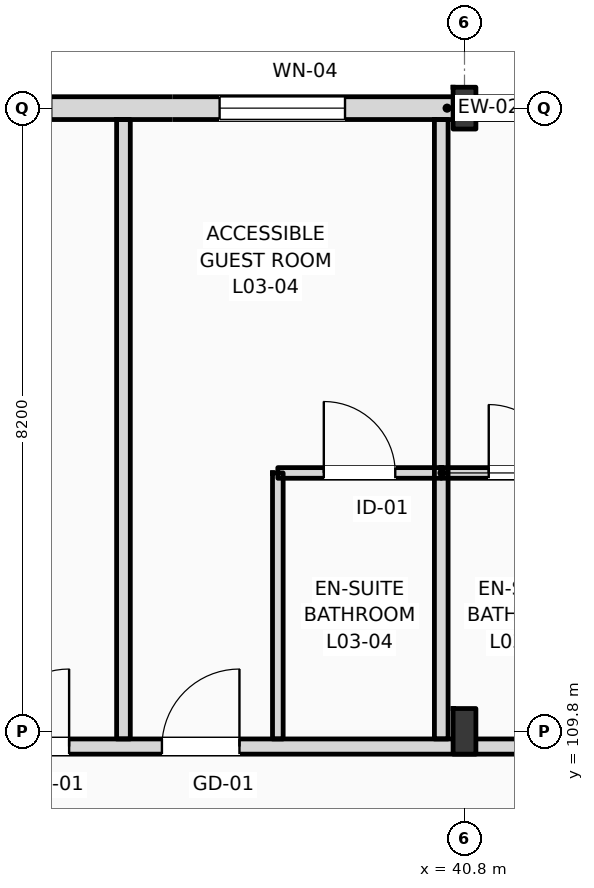
"""IFC4 building model, lengths in metres.
Left out: names, types, materials, properties, quantities, classifications, styles, units other than length and angle.
Written with IfcOpenShell. Run it as: python <this file> out.ifc"""

import sys

from ifc_helpers import new_model, si_unit, direction, frame, frame_2d, origin, origin_2d, place, context, subcontext, project, spatial, rectangle, i_section, extrude, element, fill, save


model = new_model("IFC4")
c1 = context("Model", 3, precision=1e-05, world=origin(), true_north=direction((0.0, 1.0)))
c2 = subcontext(c1, "Body", "Model", "MODEL_VIEW")
j1 = project(units=[si_unit("LENGTHUNIT", "METRE"), si_unit("PLANEANGLEUNIT", "RADIAN")], contexts=[c1])
p1 = place(None, origin())
s1 = spatial("IfcSite", under=j1, at=p1, CompositionType="ELEMENT")
p2 = place(p1, origin())
s2 = spatial("IfcBuilding", under=s1, at=p2, CompositionType="ELEMENT")
p3 = place(p2, frame((0.0, 0.0, 16.2)))
s3 = spatial("IfcBuildingStorey", under=s2, at=p3, CompositionType="ELEMENT", Elevation=16.2)
p4 = place(p3, frame((40.8, 109.8, 0.0), z_axis=(0.0, 0.0, 1.0), x_axis=(1.0, 0.0, 0.0)))
e1 = element("IfcColumn", 1, at=p4, inside=s3, PredefinedType="COLUMN", context=c2, shape_type="SweptSolid", body=[
    extrude(i_section(OverallWidth=0.3, OverallDepth=0.6, WebThickness=0.015, FlangeThickness=0.03, FilletRadius=0.027, at=origin_2d()), origin(), (0.0, 0.0, 1.0), 4.2),
])
p5 = place(p3, frame((40.8, 118.0, 0.0), z_axis=(0.0, 0.0, 1.0), x_axis=(1.0, 0.0, 0.0)))
e2 = element("IfcColumn", 2, at=p5, inside=s3, PredefinedType="COLUMN", context=c2, shape_type="SweptSolid", body=[
    extrude(i_section(OverallWidth=0.3, OverallDepth=0.55, WebThickness=0.015, FlangeThickness=0.029, FilletRadius=0.027, at=origin_2d()), origin(), (0.0, 0.0, 1.0), 4.2),
])
p6 = place(p3, frame((22.5, 118.0, 0.0), z_axis=(0.0, 0.0, 1.0), x_axis=(1.0, 0.0, 0.0)))
e3 = element("IfcWall", 3, at=p6, inside=s3, PredefinedType="STANDARD", context=c2, shape_type="SweptSolid", body=[
    extrude(rectangle(XDim=97.5, YDim=0.3, at=frame_2d((48.75, 0.0))), origin(), (0.0, 0.0, 1.0), 3.36),
])
p7 = place(p6, frame((3.721, 0.0, 0.9)))
e4 = element("IfcOpeningElement", 4, at=p7, cuts=e3, PredefinedType="OPENING", context=c2, shape_type="SweptSolid", body=[
    extrude(rectangle(XDim=0.9, YDim=1.8, at=frame_2d((0.45, 0.9))), frame((0.0, 0.16, 0.0), z_axis=(0.0, -1.0, 0.0), x_axis=(1.0, 0.0, 0.0)), (0.0, 0.0, 1.0), 0.32),
])
p8 = place(p6, frame((6.447, 0.0, 0.9)))
e5 = element("IfcOpeningElement", 5, at=p8, cuts=e3, PredefinedType="OPENING", context=c2, shape_type="SweptSolid", body=[
    extrude(rectangle(XDim=1.35, YDim=1.85, at=frame_2d((0.675, 0.925))), frame((0.0, 0.16, 0.0), z_axis=(0.0, -1.0, 0.0), x_axis=(1.0, 0.0, 0.0)), (0.0, 0.0, 1.0), 0.32),
])
p9 = place(p6, frame((11.363, 0.0, 0.9)))
e6 = element("IfcOpeningElement", 6, at=p9, cuts=e3, PredefinedType="OPENING", context=c2, shape_type="SweptSolid", body=[
    extrude(rectangle(XDim=1.5, YDim=1.9, at=frame_2d((0.75, 0.95))), frame((0.0, 0.16, 0.0), z_axis=(0.0, -1.0, 0.0), x_axis=(1.0, 0.0, 0.0)), (0.0, 0.0, 1.0), 0.32),
])
p10 = place(p6, frame((15.078, 0.0, 0.9)))
e7 = element("IfcOpeningElement", 7, at=p10, cuts=e3, PredefinedType="OPENING", context=c2, shape_type="SweptSolid", body=[
    extrude(rectangle(XDim=1.65, YDim=1.95, at=frame_2d((0.825, 0.975))), frame((0.0, 0.16, 0.0), z_axis=(0.0, -1.0, 0.0), x_axis=(1.0, 0.0, 0.0)), (0.0, 0.0, 1.0), 0.32),
])
p11 = place(p6, frame((19.395, 0.0, 0.9)))
e8 = element("IfcOpeningElement", 8, at=p11, cuts=e3, PredefinedType="OPENING", context=c2, shape_type="SweptSolid", body=[
    extrude(rectangle(XDim=1.8, YDim=2.0, at=frame_2d((0.9, 1.0))), frame((0.0, 0.16, 0.0), z_axis=(0.0, -1.0, 0.0), x_axis=(1.0, 0.0, 0.0)), (0.0, 0.0, 1.0), 0.32),
])
p12 = place(p6, frame((23.31, 0.0, 0.9)))
e9 = element("IfcOpeningElement", 9, at=p12, cuts=e3, PredefinedType="OPENING", context=c2, shape_type="SweptSolid", body=[
    extrude(rectangle(XDim=1.95, YDim=2.05, at=frame_2d((0.975, 1.025))), frame((0.0, 0.16, 0.0), z_axis=(0.0, -1.0, 0.0), x_axis=(1.0, 0.0, 0.0)), (0.0, 0.0, 1.0), 0.32),
])
p13 = place(p6, frame((28.026, 0.0, 0.9)))
e10 = element("IfcOpeningElement", 10, at=p13, cuts=e3, PredefinedType="OPENING", context=c2, shape_type="SweptSolid", body=[
    extrude(rectangle(XDim=2.1, YDim=2.1, at=frame_2d((1.05, 1.05))), frame((0.0, 0.16, 0.0), z_axis=(0.0, -1.0, 0.0), x_axis=(1.0, 0.0, 0.0)), (0.0, 0.0, 1.0), 0.32),
])
p14 = place(p6, frame((31.941, 0.0, 0.9)))
e11 = element("IfcOpeningElement", 11, at=p14, cuts=e3, PredefinedType="OPENING", context=c2, shape_type="SweptSolid", body=[
    extrude(rectangle(XDim=1.1, YDim=2.15, at=frame_2d((0.55, 1.075))), frame((0.0, 0.16, 0.0), z_axis=(0.0, -1.0, 0.0), x_axis=(1.0, 0.0, 0.0)), (0.0, 0.0, 1.0), 0.32),
])
p15 = place(p6, frame((36.657, 0.0, 0.9)))
e12 = element("IfcOpeningElement", 12, at=p15, cuts=e3, PredefinedType="OPENING", context=c2, shape_type="SweptSolid", body=[
    extrude(rectangle(XDim=2.4, YDim=2.2, at=frame_2d((1.2, 1.1))), frame((0.0, 0.16, 0.0), z_axis=(0.0, -1.0, 0.0), x_axis=(1.0, 0.0, 0.0)), (0.0, 0.0, 1.0), 0.32),
])
p16 = place(p6, frame((42.574, 0.0, 0.9)))
e13 = element("IfcOpeningElement", 13, at=p16, cuts=e3, PredefinedType="OPENING", context=c2, shape_type="SweptSolid", body=[
    extrude(rectangle(XDim=1.35, YDim=2.25, at=frame_2d((0.675, 1.125))), frame((0.0, 0.16, 0.0), z_axis=(0.0, -1.0, 0.0), x_axis=(1.0, 0.0, 0.0)), (0.0, 0.0, 1.0), 0.32),
])
p17 = place(p6, frame((45.289, 0.0, 0.9)))
e14 = element("IfcOpeningElement", 14, at=p17, cuts=e3, PredefinedType="OPENING", context=c2, shape_type="SweptSolid", body=[
    extrude(rectangle(XDim=2.7, YDim=2.28, at=frame_2d((1.35, 1.14))), frame((0.0, 0.16, 0.0), z_axis=(0.0, -1.0, 0.0), x_axis=(1.0, 0.0, 0.0)), (0.0, 0.0, 1.0), 0.32),
])
p18 = place(p6, frame((50.406, 0.0, 0.9)))
e15 = element("IfcOpeningElement", 15, at=p18, cuts=e3, PredefinedType="OPENING", context=c2, shape_type="SweptSolid", body=[
    extrude(rectangle(XDim=1.8, YDim=2.28, at=frame_2d((0.9, 1.14))), frame((0.0, 0.16, 0.0), z_axis=(0.0, -1.0, 0.0), x_axis=(1.0, 0.0, 0.0)), (0.0, 0.0, 1.0), 0.32),
])
p19 = place(p6, frame((53.922, 0.0, 0.9)))
e16 = element("IfcOpeningElement", 16, at=p19, cuts=e3, PredefinedType="OPENING", context=c2, shape_type="SweptSolid", body=[
    extrude(rectangle(XDim=1.8, YDim=2.28, at=frame_2d((0.9, 1.14))), frame((0.0, 0.16, 0.0), z_axis=(0.0, -1.0, 0.0), x_axis=(1.0, 0.0, 0.0)), (0.0, 0.0, 1.0), 0.32),
])
p20 = place(p6, frame((58.332, 0.0, 0.9)))
e17 = element("IfcOpeningElement", 17, at=p20, cuts=e3, PredefinedType="OPENING", context=c2, shape_type="SweptSolid", body=[
    extrude(rectangle(XDim=2.961, YDim=2.28, at=frame_2d((1.48, 1.14))), frame((0.0, 0.16, 0.0), z_axis=(0.0, -1.0, 0.0), x_axis=(1.0, 0.0, 0.0)), (0.0, 0.0, 1.0), 0.32),
])
p21 = place(p6, frame((62.513, 0.0, 0.9)))
e18 = element("IfcOpeningElement", 18, at=p21, cuts=e3, PredefinedType="OPENING", context=c2, shape_type="SweptSolid", body=[
    extrude(rectangle(XDim=1.8, YDim=2.28, at=frame_2d((0.9, 1.14))), frame((0.0, 0.16, 0.0), z_axis=(0.0, -1.0, 0.0), x_axis=(1.0, 0.0, 0.0)), (0.0, 0.0, 1.0), 0.32),
])
p22 = place(p6, frame((67.114, 0.0, 0.9)))
e19 = element("IfcOpeningElement", 19, at=p22, cuts=e3, PredefinedType="OPENING", context=c2, shape_type="SweptSolid", body=[
    extrude(rectangle(XDim=2.961, YDim=2.28, at=frame_2d((1.48, 1.14))), frame((0.0, 0.16, 0.0), z_axis=(0.0, -1.0, 0.0), x_axis=(1.0, 0.0, 0.0)), (0.0, 0.0, 1.0), 0.32),
])
p23 = place(p6, frame((73.695, 0.0, 0.9)))
e20 = element("IfcOpeningElement", 20, at=p23, cuts=e3, PredefinedType="OPENING", context=c2, shape_type="SweptSolid", body=[
    extrude(rectangle(XDim=1.1, YDim=2.28, at=frame_2d((0.55, 1.14))), frame((0.0, 0.16, 0.0), z_axis=(0.0, -1.0, 0.0), x_axis=(1.0, 0.0, 0.0)), (0.0, 0.0, 1.0), 0.32),
])
p24 = place(p6, frame((75.895, 0.0, 0.9)))
e21 = element("IfcOpeningElement", 21, at=p24, cuts=e3, PredefinedType="OPENING", context=c2, shape_type="SweptSolid", body=[
    extrude(rectangle(XDim=2.961, YDim=2.28, at=frame_2d((1.48, 1.14))), frame((0.0, 0.16, 0.0), z_axis=(0.0, -1.0, 0.0), x_axis=(1.0, 0.0, 0.0)), (0.0, 0.0, 1.0), 0.32),
])
p25 = place(p6, frame((81.676, 0.0, 0.9)))
e22 = element("IfcOpeningElement", 22, at=p25, cuts=e3, PredefinedType="OPENING", context=c2, shape_type="SweptSolid", body=[
    extrude(rectangle(XDim=1.8, YDim=2.28, at=frame_2d((0.9, 1.14))), frame((0.0, 0.16, 0.0), z_axis=(0.0, -1.0, 0.0), x_axis=(1.0, 0.0, 0.0)), (0.0, 0.0, 1.0), 0.32),
])
p26 = place(p6, frame((84.677, 0.0, 0.9)))
e23 = element("IfcOpeningElement", 23, at=p26, cuts=e3, PredefinedType="OPENING", context=c2, shape_type="SweptSolid", body=[
    extrude(rectangle(XDim=2.961, YDim=2.28, at=frame_2d((1.48, 1.14))), frame((0.0, 0.16, 0.0), z_axis=(0.0, -1.0, 0.0), x_axis=(1.0, 0.0, 0.0)), (0.0, 0.0, 1.0), 0.32),
])
p27 = place(p6, frame((89.999, 0.0, 0.9)))
e24 = element("IfcOpeningElement", 24, at=p27, cuts=e3, PredefinedType="OPENING", context=c2, shape_type="SweptSolid", body=[
    extrude(rectangle(XDim=1.1, YDim=1.5, at=frame_2d((0.55, 0.75))), frame((0.0, 0.16, 0.0), z_axis=(0.0, -1.0, 0.0), x_axis=(1.0, 0.0, 0.0)), (0.0, 0.0, 1.0), 0.32),
])
p28 = place(p6, frame((94.35, 0.0, 0.9)))
e25 = element("IfcOpeningElement", 25, at=p28, cuts=e3, PredefinedType="OPENING", context=c2, shape_type="SweptSolid", body=[
    extrude(rectangle(XDim=1.25, YDim=1.6, at=frame_2d((0.625, 0.8))), frame((0.0, 0.16, 0.0), z_axis=(0.0, -1.0, 0.0), x_axis=(1.0, 0.0, 0.0)), (0.0, 0.0, 1.0), 0.32),
])
p29 = place(p3, frame((10.65, 109.6, 0.0), z_axis=(0.0, 0.0, 1.0), x_axis=(1.0, 0.0, 0.0)))
e26 = element("IfcWall", 26, at=p29, inside=s3, PredefinedType="PARTITIONING", context=c2, shape_type="SweptSolid", body=[
    extrude(rectangle(XDim=109.21, YDim=0.2, at=frame_2d((54.605, 0.0))), origin(), (0.0, 0.0, 1.0), 3.36),
])
p30 = place(p29, frame((15.43, 0.0, 0.0)))
e27 = element("IfcOpeningElement", 27, at=p30, cuts=e26, PredefinedType="OPENING", context=c2, shape_type="SweptSolid", body=[
    extrude(rectangle(XDim=1.02, YDim=2.2, at=frame_2d((0.51, 1.1))), frame((0.0, 0.11, 0.0), z_axis=(0.0, -1.0, 0.0), x_axis=(1.0, 0.0, 0.0)), (0.0, 0.0, 1.0), 0.22),
])
p31 = place(p29, frame((19.537, 0.0, 0.0)))
e28 = element("IfcOpeningElement", 28, at=p31, cuts=e26, PredefinedType="OPENING", context=c2, shape_type="SweptSolid", body=[
    extrude(rectangle(XDim=1.02, YDim=2.2, at=frame_2d((0.51, 1.1))), frame((0.0, 0.11, 0.0), z_axis=(0.0, -1.0, 0.0), x_axis=(1.0, 0.0, 0.0)), (0.0, 0.0, 1.0), 0.22),
])
p32 = place(p29, frame((23.928, 0.0, 0.0)))
e29 = element("IfcOpeningElement", 29, at=p32, cuts=e26, PredefinedType="OPENING", context=c2, shape_type="SweptSolid", body=[
    extrude(rectangle(XDim=1.02, YDim=2.2, at=frame_2d((0.51, 1.1))), frame((0.0, 0.11, 0.0), z_axis=(0.0, -1.0, 0.0), x_axis=(1.0, 0.0, 0.0)), (0.0, 0.0, 1.0), 0.22),
])
p33 = place(p29, frame((26.169, 0.0, 0.0)))
e30 = element("IfcOpeningElement", 30, at=p33, cuts=e26, PredefinedType="OPENING", context=c2, shape_type="SweptSolid", body=[
    extrude(rectangle(XDim=1.02, YDim=2.2, at=frame_2d((0.51, 1.1))), frame((0.0, 0.11, 0.0), z_axis=(0.0, -1.0, 0.0), x_axis=(1.0, 0.0, 0.0)), (0.0, 0.0, 1.0), 0.22),
])
p34 = place(p29, frame((32.739, 0.0, 0.0)))
e31 = element("IfcOpeningElement", 31, at=p34, cuts=e26, PredefinedType="OPENING", context=c2, shape_type="SweptSolid", body=[
    extrude(rectangle(XDim=0.96, YDim=2.2, at=frame_2d((0.48, 1.1))), frame((0.0, 0.11, 0.0), z_axis=(0.0, -1.0, 0.0), x_axis=(1.0, 0.0, 0.0)), (0.0, 0.0, 1.0), 0.22),
])
p35 = place(p29, frame((34.98, 0.0, 0.0)))
e32 = element("IfcOpeningElement", 32, at=p35, cuts=e26, PredefinedType="OPENING", context=c2, shape_type="SweptSolid", body=[
    extrude(rectangle(XDim=0.96, YDim=2.2, at=frame_2d((0.48, 1.1))), frame((0.0, 0.11, 0.0), z_axis=(0.0, -1.0, 0.0), x_axis=(1.0, 0.0, 0.0)), (0.0, 0.0, 1.0), 0.22),
])
p36 = place(p29, frame((41.521, 0.0, 0.0)))
e33 = element("IfcOpeningElement", 33, at=p36, cuts=e26, PredefinedType="OPENING", context=c2, shape_type="SweptSolid", body=[
    extrude(rectangle(XDim=0.96, YDim=2.2, at=frame_2d((0.48, 1.1))), frame((0.0, 0.11, 0.0), z_axis=(0.0, -1.0, 0.0), x_axis=(1.0, 0.0, 0.0)), (0.0, 0.0, 1.0), 0.22),
])
p37 = place(p29, frame((43.512, 0.0, 0.0)))
e34 = element("IfcOpeningElement", 34, at=p37, cuts=e26, PredefinedType="OPENING", context=c2, shape_type="SweptSolid", body=[
    extrude(rectangle(XDim=0.96, YDim=2.2, at=frame_2d((0.48, 1.1))), frame((0.0, 0.11, 0.0), z_axis=(0.0, -1.0, 0.0), x_axis=(1.0, 0.0, 0.0)), (0.0, 0.0, 1.0), 0.22),
])
p38 = place(p29, frame((50.303, 0.0, 0.0)))
e35 = element("IfcOpeningElement", 35, at=p38, cuts=e26, PredefinedType="OPENING", context=c2, shape_type="SweptSolid", body=[
    extrude(rectangle(XDim=0.96, YDim=2.2, at=frame_2d((0.48, 1.1))), frame((0.0, 0.11, 0.0), z_axis=(0.0, -1.0, 0.0), x_axis=(1.0, 0.0, 0.0)), (0.0, 0.0, 1.0), 0.22),
])
p39 = place(p29, frame((54.944, 0.0, 0.0)))
e36 = element("IfcOpeningElement", 36, at=p39, cuts=e26, PredefinedType="OPENING", context=c2, shape_type="SweptSolid", body=[
    extrude(rectangle(XDim=0.96, YDim=2.2, at=frame_2d((0.48, 1.1))), frame((0.0, 0.11, 0.0), z_axis=(0.0, -1.0, 0.0), x_axis=(1.0, 0.0, 0.0)), (0.0, 0.0, 1.0), 0.22),
])
p40 = place(p29, frame((59.085, 0.0, 0.0)))
e37 = element("IfcOpeningElement", 37, at=p40, cuts=e26, PredefinedType="OPENING", context=c2, shape_type="SweptSolid", body=[
    extrude(rectangle(XDim=0.96, YDim=2.2, at=frame_2d((0.48, 1.1))), frame((0.0, 0.11, 0.0), z_axis=(0.0, -1.0, 0.0), x_axis=(1.0, 0.0, 0.0)), (0.0, 0.0, 1.0), 0.22),
])
p41 = place(p29, frame((63.476, 0.0, 0.0)))
e38 = element("IfcOpeningElement", 38, at=p41, cuts=e26, PredefinedType="OPENING", context=c2, shape_type="SweptSolid", body=[
    extrude(rectangle(XDim=0.96, YDim=2.2, at=frame_2d((0.48, 1.1))), frame((0.0, 0.11, 0.0), z_axis=(0.0, -1.0, 0.0), x_axis=(1.0, 0.0, 0.0)), (0.0, 0.0, 1.0), 0.22),
])
p42 = place(p29, frame((65.716, 0.0, 0.0)))
e39 = element("IfcOpeningElement", 39, at=p42, cuts=e26, PredefinedType="OPENING", context=c2, shape_type="SweptSolid", body=[
    extrude(rectangle(XDim=0.96, YDim=2.2, at=frame_2d((0.48, 1.1))), frame((0.0, 0.11, 0.0), z_axis=(0.0, -1.0, 0.0), x_axis=(1.0, 0.0, 0.0)), (0.0, 0.0, 1.0), 0.22),
])
p43 = place(p29, frame((72.257, 0.0, 0.0)))
e40 = element("IfcOpeningElement", 40, at=p43, cuts=e26, PredefinedType="OPENING", context=c2, shape_type="SweptSolid", body=[
    extrude(rectangle(XDim=0.96, YDim=2.2, at=frame_2d((0.48, 1.1))), frame((0.0, 0.11, 0.0), z_axis=(0.0, -1.0, 0.0), x_axis=(1.0, 0.0, 0.0)), (0.0, 0.0, 1.0), 0.22),
])
p44 = place(p29, frame((74.498, 0.0, 0.0)))
e41 = element("IfcOpeningElement", 41, at=p44, cuts=e26, PredefinedType="OPENING", context=c2, shape_type="SweptSolid", body=[
    extrude(rectangle(XDim=0.96, YDim=2.2, at=frame_2d((0.48, 1.1))), frame((0.0, 0.11, 0.0), z_axis=(0.0, -1.0, 0.0), x_axis=(1.0, 0.0, 0.0)), (0.0, 0.0, 1.0), 0.22),
])
p45 = place(p29, frame((81.039, 0.0, 0.0)))
e42 = element("IfcOpeningElement", 42, at=p45, cuts=e26, PredefinedType="OPENING", context=c2, shape_type="SweptSolid", body=[
    extrude(rectangle(XDim=0.96, YDim=2.2, at=frame_2d((0.48, 1.1))), frame((0.0, 0.11, 0.0), z_axis=(0.0, -1.0, 0.0), x_axis=(1.0, 0.0, 0.0)), (0.0, 0.0, 1.0), 0.22),
])
p46 = place(p29, frame((85.68, 0.0, 0.0)))
e43 = element("IfcOpeningElement", 43, at=p46, cuts=e26, PredefinedType="OPENING", context=c2, shape_type="SweptSolid", body=[
    extrude(rectangle(XDim=0.96, YDim=2.2, at=frame_2d((0.48, 1.1))), frame((0.0, 0.11, 0.0), z_axis=(0.0, -1.0, 0.0), x_axis=(1.0, 0.0, 0.0)), (0.0, 0.0, 1.0), 0.22),
])
p47 = place(p29, frame((89.82, 0.0, 0.0)))
e44 = element("IfcOpeningElement", 44, at=p47, cuts=e26, PredefinedType="OPENING", context=c2, shape_type="SweptSolid", body=[
    extrude(rectangle(XDim=0.96, YDim=2.2, at=frame_2d((0.48, 1.1))), frame((0.0, 0.11, 0.0), z_axis=(0.0, -1.0, 0.0), x_axis=(1.0, 0.0, 0.0)), (0.0, 0.0, 1.0), 0.22),
])
p48 = place(p29, frame((94.211, 0.0, 0.0)))
e45 = element("IfcOpeningElement", 45, at=p48, cuts=e26, PredefinedType="OPENING", context=c2, shape_type="SweptSolid", body=[
    extrude(rectangle(XDim=0.96, YDim=2.2, at=frame_2d((0.48, 1.1))), frame((0.0, 0.11, 0.0), z_axis=(0.0, -1.0, 0.0), x_axis=(1.0, 0.0, 0.0)), (0.0, 0.0, 1.0), 0.22),
])
p49 = place(p29, frame((98.602, 0.0, 0.0)))
e46 = element("IfcOpeningElement", 46, at=p49, cuts=e26, PredefinedType="OPENING", context=c2, shape_type="SweptSolid", body=[
    extrude(rectangle(XDim=0.96, YDim=2.2, at=frame_2d((0.48, 1.1))), frame((0.0, 0.11, 0.0), z_axis=(0.0, -1.0, 0.0), x_axis=(1.0, 0.0, 0.0)), (0.0, 0.0, 1.0), 0.22),
])
p50 = place(p29, frame((102.993, 0.0, 0.0)))
e47 = element("IfcOpeningElement", 47, at=p50, cuts=e26, PredefinedType="OPENING", context=c2, shape_type="SweptSolid", body=[
    extrude(rectangle(XDim=0.96, YDim=2.2, at=frame_2d((0.48, 1.1))), frame((0.0, 0.11, 0.0), z_axis=(0.0, -1.0, 0.0), x_axis=(1.0, 0.0, 0.0)), (0.0, 0.0, 1.0), 0.22),
])
p51 = place(p29, frame((105.269, 0.0, 0.0)))
e48 = element("IfcOpeningElement", 48, at=p51, cuts=e26, PredefinedType="OPENING", context=c2, shape_type="SweptSolid", body=[
    extrude(rectangle(XDim=0.96, YDim=2.2, at=frame_2d((0.48, 1.1))), frame((0.0, 0.11, 0.0), z_axis=(0.0, -1.0, 0.0), x_axis=(1.0, 0.0, 0.0)), (0.0, 0.0, 1.0), 0.22),
])
p52 = place(p29, frame((2.716, 0.0, 0.0)))
e49 = element("IfcOpeningElement", 49, at=p52, cuts=e26, PredefinedType="OPENING", context=c2, shape_type="SweptSolid", body=[
    extrude(rectangle(XDim=1.35, YDim=2.25, at=frame_2d((0.675, 1.125))), frame((0.0, 0.11, 0.0), z_axis=(0.0, -1.0, 0.0), x_axis=(1.0, 0.0, 0.0)), (0.0, 0.0, 1.0), 0.22),
])
p53 = place(p29, frame((6.65, 0.0, 0.0)))
e50 = element("IfcOpeningElement", 50, at=p53, cuts=e26, PredefinedType="OPENING", context=c2, shape_type="SweptSolid", body=[
    extrude(rectangle(XDim=1.35, YDim=2.25, at=frame_2d((0.675, 1.125))), frame((0.0, 0.11, 0.0), z_axis=(0.0, -1.0, 0.0), x_axis=(1.0, 0.0, 0.0)), (0.0, 0.0, 1.0), 0.22),
])
p54 = place(p29, frame((10.583, 0.0, 0.0)))
e51 = element("IfcOpeningElement", 51, at=p54, cuts=e26, PredefinedType="OPENING", context=c2, shape_type="SweptSolid", body=[
    extrude(rectangle(XDim=1.35, YDim=2.25, at=frame_2d((0.675, 1.125))), frame((0.0, 0.11, 0.0), z_axis=(0.0, -1.0, 0.0), x_axis=(1.0, 0.0, 0.0)), (0.0, 0.0, 1.0), 0.22),
])
for number, where, z_axis, x_axis in (
    (52, (36.313, 109.7, 0.0), (0.0, 0.0, 1.0), (0.0, 1.0, 0.0)),
    (53, (40.494, 109.7, 0.0), (0.0, 0.0, 1.0), (0.0, 1.0, 0.0)),
):
    element("IfcWall", number, at=place(p3, frame(where, z_axis=z_axis, x_axis=x_axis)), inside=s3, PredefinedType="PARTITIONING", context=c2, shape_type="SweptSolid", body=[
        extrude(rectangle(XDim=8.15, YDim=0.18, at=frame_2d((4.075, 0.0))), origin(), (0.0, 0.0, 1.0), 3.92),
    ])
p55 = place(p3, frame((38.344, 109.7, 0.0), z_axis=(0.0, 0.0, 1.0), x_axis=(0.0, 1.0, 0.0)))
e54 = element("IfcWall", 54, at=p55, inside=s3, PredefinedType="PARTITIONING", context=c2, shape_type="SweptSolid", body=[
    extrude(rectangle(XDim=3.5, YDim=0.14, at=frame_2d((1.75, 0.0))), origin(), (0.0, 0.0, 1.0), 3.61),
])
p56 = place(p3, frame((38.344, 113.2, 0.0), z_axis=(0.0, 0.0, 1.0), x_axis=(1.0, 0.0, 0.0)))
e55 = element("IfcWall", 55, at=p56, inside=s3, PredefinedType="PARTITIONING", context=c2, shape_type="SweptSolid", body=[
    extrude(rectangle(XDim=2.15, YDim=0.14, at=frame_2d((1.075, 0.0))), origin(), (0.0, 0.0, 1.0), 3.92),
])
p57 = place(p56, frame((0.605, 0.0, 0.0)))
e56 = element("IfcOpeningElement", 56, at=p57, cuts=e55, PredefinedType="OPENING", context=c2, shape_type="SweptSolid", body=[
    extrude(rectangle(XDim=0.94, YDim=2.15, at=frame_2d((0.47, 1.075))), frame((0.0, 0.08, 0.0), z_axis=(0.0, -1.0, 0.0), x_axis=(1.0, 0.0, 0.0)), (0.0, 0.0, 1.0), 0.16),
])
p58 = place(p3, frame((40.494, 113.2, 0.0), z_axis=(0.0, 0.0, 1.0), x_axis=(1.0, 0.0, 0.0)))
e57 = element("IfcWall", 57, at=p58, inside=s3, PredefinedType="PARTITIONING", context=c2, shape_type="SweptSolid", body=[
    extrude(rectangle(XDim=2.15, YDim=0.14, at=frame_2d((1.075, 0.0))), origin(), (0.0, 0.0, 1.0), 3.92),
])
p59 = place(p58, frame((0.625, 0.0, 0.0)))
e58 = element("IfcOpeningElement", 58, at=p59, cuts=e57, PredefinedType="OPENING", context=c2, shape_type="SweptSolid", body=[
    extrude(rectangle(XDim=0.9, YDim=2.1, at=frame_2d((0.45, 1.05))), frame((0.0, 0.08, 0.0), z_axis=(0.0, -1.0, 0.0), x_axis=(1.0, 0.0, 0.0)), (0.0, 0.0, 1.0), 0.16),
])
p60 = place(p10, origin())
e59 = element("IfcWindow", 59, at=p60, inside=s3, PartitioningType="DOUBLE_PANEL_VERTICAL", PredefinedType="WINDOW", context=c2, shape_type="SweptSolid", body=[
    extrude(rectangle(XDim=1.65, YDim=1.95, at=frame_2d((0.825, 0.975))), frame((0.0, 0.03, 0.0), z_axis=(0.0, -1.0, 0.0), x_axis=(1.0, 0.0, 0.0)), (0.0, 0.0, 1.0), 0.06),
])
fill(e7, e59)
p61 = place(p32, origin())
e60 = element("IfcDoor", 60, at=p61, inside=s3, OperationType="SINGLE_SWING_RIGHT", PredefinedType="DOOR", context=c2, shape_type="SweptSolid", body=[
    extrude(rectangle(XDim=1.02, YDim=2.2, at=frame_2d((0.51, 1.1))), frame((0.0, 0.025, 0.0), z_axis=(0.0, -1.0, 0.0), x_axis=(1.0, 0.0, 0.0)), (0.0, 0.0, 1.0), 0.05),
])
fill(e29, e60)
p62 = place(p33, origin())
e61 = element("IfcDoor", 61, at=p62, inside=s3, OperationType="SINGLE_SWING_RIGHT", PredefinedType="DOOR", context=c2, shape_type="SweptSolid", body=[
    extrude(rectangle(XDim=1.02, YDim=2.2, at=frame_2d((0.51, 1.1))), frame((0.0, 0.025, 0.0), z_axis=(0.0, -1.0, 0.0), x_axis=(1.0, 0.0, 0.0)), (0.0, 0.0, 1.0), 0.05),
])
fill(e30, e61)
p63 = place(p57, origin())
e62 = element("IfcDoor", 62, at=p63, inside=s3, OperationType="SINGLE_SWING_LEFT", PredefinedType="DOOR", context=c2, shape_type="SweptSolid", body=[
    extrude(rectangle(XDim=0.94, YDim=2.15, at=frame_2d((0.47, 1.075))), frame((0.0, 0.025, 0.0), z_axis=(0.0, -1.0, 0.0), x_axis=(1.0, 0.0, 0.0)), (0.0, 0.0, 1.0), 0.05),
])
fill(e56, e62)
p64 = place(p59, origin())
e63 = element("IfcDoor", 63, at=p64, inside=s3, OperationType="SINGLE_SWING_LEFT", PredefinedType="DOOR", context=c2, shape_type="SweptSolid", body=[
    extrude(rectangle(XDim=0.9, YDim=2.1, at=frame_2d((0.45, 1.05))), frame((0.0, 0.025, 0.0), z_axis=(0.0, -1.0, 0.0), x_axis=(1.0, 0.0, 0.0)), (0.0, 0.0, 1.0), 0.05),
])
fill(e58, e63)
save(model, sys.argv[1])
